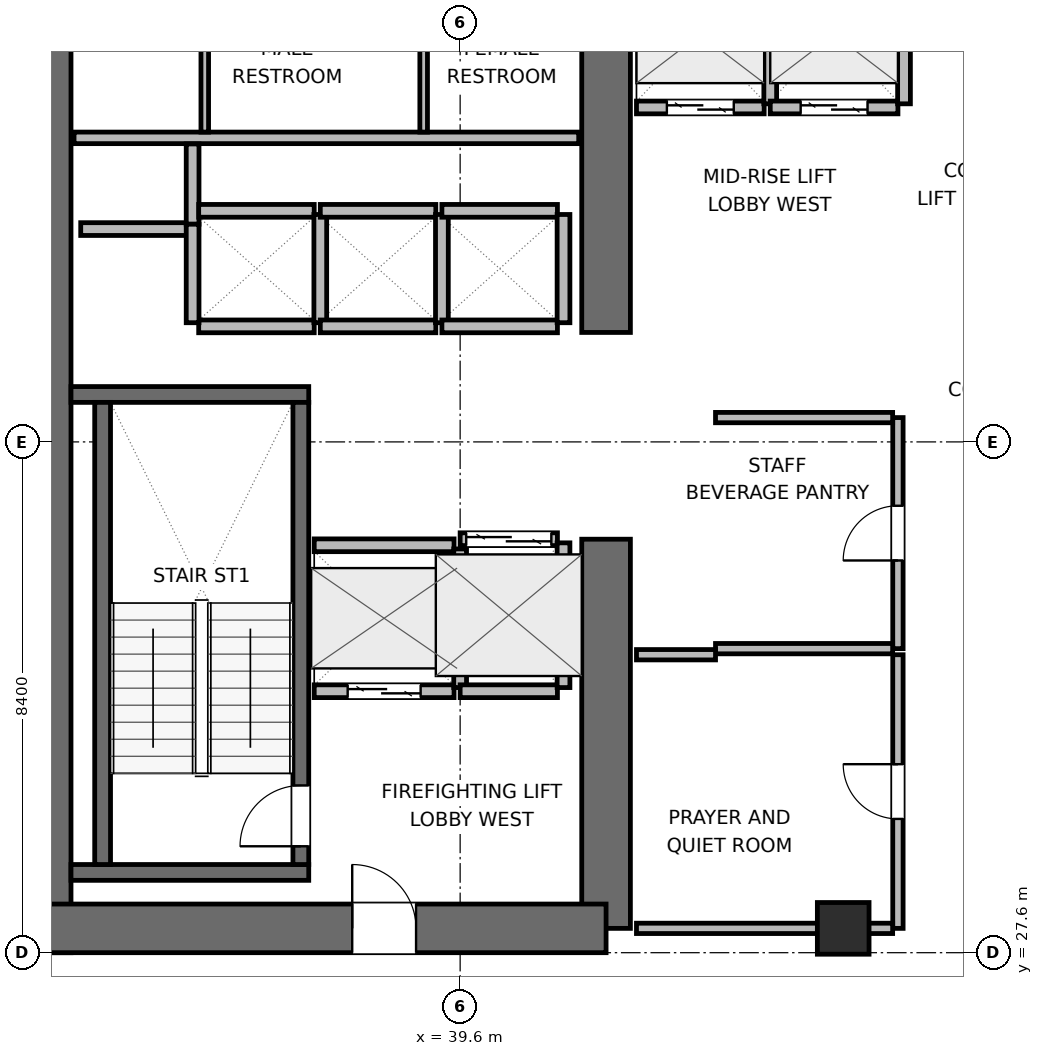
"""IFC4 building model, lengths in metres.
Left out: names, types, materials, properties, quantities, classifications, styles, units other than length and angle.
Written with IfcOpenShell. Run it as: python <this file> out.ifc"""

import sys

from ifc_helpers import new_model, si_unit, direction, frame, frame_2d, origin, origin_2d, place, context, subcontext, project, spatial, rectangle, extrude, element, fill, save


model = new_model("IFC4")
c1 = context("Model", 3, precision=1e-05, world=origin(), true_north=direction((0.0, 1.0)))
c2 = subcontext(c1, "Body", "Model", "MODEL_VIEW")
j1 = project(units=[si_unit("LENGTHUNIT", "METRE"), si_unit("PLANEANGLEUNIT", "RADIAN")], contexts=[c1])
p1 = place(None, origin())
s1 = spatial("IfcSite", under=j1, at=p1, CompositionType="ELEMENT")
p2 = place(p1, origin())
s2 = spatial("IfcBuilding", under=s1, at=p2, CompositionType="ELEMENT")
p3 = place(p2, frame((0.0, 0.0, 154.5)))
s3 = spatial("IfcBuildingStorey", under=s2, at=p3, CompositionType="ELEMENT", Elevation=154.5)
p4 = place(p3, frame((32.8, 27.6, 0.0), z_axis=(0.0, 0.0, 1.0), x_axis=(0.0, 1.0, 0.0)))
e1 = element("IfcWall", 1, at=p4, inside=s3, PredefinedType="SHEAR", context=c2, shape_type="SweptSolid", body=[
    extrude(rectangle(XDim=16.8, YDim=0.8, at=frame_2d((8.4, 0.0))), origin(), (0.0, 0.0, 1.0), 3.9),
])
p5 = place(p3, frame((42.0, 28.0, 0.0), z_axis=(0.0, 0.0, 1.0), x_axis=(0.0, 1.0, 0.0)))
e2 = element("IfcWall", 2, at=p5, inside=s3, PredefinedType="SHEAR", context=c2, shape_type="SweptSolid", body=[
    extrude(rectangle(XDim=6.4, YDim=0.8, at=frame_2d((3.2, 0.0))), origin(), (0.0, 0.0, 1.0), 3.9),
])
p6 = place(p3, frame((42.0, 37.8, 0.0), z_axis=(0.0, 0.0, 1.0), x_axis=(0.0, 1.0, 0.0)))
e3 = element("IfcWall", 3, at=p6, inside=s3, PredefinedType="SHEAR", context=c2, shape_type="SweptSolid", body=[
    extrude(rectangle(XDim=6.2, YDim=0.8, at=frame_2d((3.1, 0.0))), origin(), (0.0, 0.0, 1.0), 3.9),
])
p7 = place(p3, frame((32.8, 28.0, 0.0), z_axis=(0.0, 0.0, 1.0), x_axis=(1.0, 0.0, 0.0)))
e4 = element("IfcWall", 4, at=p7, inside=s3, PredefinedType="SHEAR", context=c2, shape_type="SweptSolid", body=[
    extrude(rectangle(XDim=9.2, YDim=0.8, at=frame_2d((4.6, 0.0))), origin(), (0.0, 0.0, 1.0), 3.9),
])
p8 = place(p7, frame((5.025, 0.0, 0.0)))
e5 = element("IfcOpeningElement", 5, at=p8, cuts=e4, PredefinedType="OPENING", context=c2, shape_type="SweptSolid", body=[
    extrude(rectangle(XDim=1.05, YDim=2.04, at=frame_2d((0.525, 1.02))), frame((0.0, 0.41, 0.0), z_axis=(0.0, -1.0, 0.0), x_axis=(1.0, 0.0, 0.0)), (0.0, 0.0, 1.0), 0.82),
])
for number, where, z_axis, x_axis in (
    (6, (33.2, 28.92, 0.0), (0.0, 0.0, 1.0), (1.0, 0.0, 0.0)),
    (7, (33.2, 36.78, 0.0), (0.0, 0.0, 1.0), (1.0, 0.0, 0.0)),
):
    element("IfcWall", number, at=place(p3, frame(where, z_axis=z_axis, x_axis=x_axis)), inside=s3, PredefinedType="SHEAR", context=c2, shape_type="SweptSolid", body=[
        extrude(rectangle(XDim=3.91, YDim=0.26, at=frame_2d((1.955, 0.0))), origin(), (0.0, 0.0, 1.0), 3.9),
    ])
p9 = place(p3, frame((33.72, 29.05, 0.0), z_axis=(0.0, 0.0, 1.0), x_axis=(0.0, 1.0, 0.0)))
e8 = element("IfcWall", 8, at=p9, inside=s3, PredefinedType="SHEAR", context=c2, shape_type="SweptSolid", body=[
    extrude(rectangle(XDim=7.6, YDim=0.26, at=frame_2d((3.8, 0.0))), origin(), (0.0, 0.0, 1.0), 3.9),
])
p10 = place(p3, frame((36.98, 29.05, 0.0), z_axis=(0.0, 0.0, 1.0), x_axis=(0.0, 1.0, 0.0)))
e9 = element("IfcWall", 9, at=p10, inside=s3, PredefinedType="SHEAR", context=c2, shape_type="SweptSolid", body=[
    extrude(rectangle(XDim=7.6, YDim=0.26, at=frame_2d((3.8, 0.0))), origin(), (0.0, 0.0, 1.0), 3.9),
])
p11 = place(p10, frame((0.3, 0.0, 0.0)))
e10 = element("IfcOpeningElement", 10, at=p11, cuts=e9, PredefinedType="OPENING", context=c2, shape_type="SweptSolid", body=[
    extrude(rectangle(XDim=1.0, YDim=2.04, at=frame_2d((0.5, 1.02))), frame((0.0, 0.14, 0.0), z_axis=(0.0, -1.0, 0.0), x_axis=(1.0, 0.0, 0.0)), (0.0, 0.0, 1.0), 0.28),
])
p12 = place(p3, frame((45.9, 28.0, 0.0), z_axis=(0.0, 0.0, 1.0), x_axis=(1.0, 0.0, 0.0)))
e11 = element("IfcColumn", 11, at=p12, inside=s3, PredefinedType="COLUMN", context=c2, shape_type="SweptSolid", body=[
    extrude(rectangle(XDim=0.85, YDim=0.85, at=origin_2d()), origin(), (0.0, 0.0, 1.0), 3.9),
])
p13 = place(p3, frame((33.25, 41.0, 0.0), z_axis=(0.0, 0.0, 1.0), x_axis=(1.0, 0.0, 0.0)))
e12 = element("IfcWall", 12, at=p13, inside=s3, PredefinedType="PLUMBINGWALL", context=c2, shape_type="SweptSolid", body=[
    extrude(rectangle(XDim=8.3, YDim=0.19, at=frame_2d((4.15, 0.0))), origin(), (0.0, 0.0, 1.0), 3.68),
])
for number, where, z_axis, x_axis in (
    (13, (35.4, 41.095, 0.0), (0.0, 0.0, 1.0), (0.0, 1.0, 0.0)),
    (14, (39.0, 41.095, 0.0), (0.0, 0.0, 1.0), (0.0, 1.0, 0.0)),
):
    element("IfcWall", number, at=place(p3, frame(where, z_axis=z_axis, x_axis=x_axis)), inside=s3, PredefinedType="PARTITIONING", context=c2, shape_type="SweptSolid", body=[
        extrude(rectangle(XDim=2.455, YDim=0.125, at=frame_2d((1.228, 0.0))), origin(), (0.0, 0.0, 1.0), 3.68),
    ])
p14 = place(p3, frame((33.36, 39.5, 0.0), z_axis=(0.0, 0.0, 1.0), x_axis=(1.0, 0.0, 0.0)))
e15 = element("IfcWall", 15, at=p14, inside=s3, PredefinedType="PARTITIONING", context=c2, shape_type="SweptSolid", body=[
    extrude(rectangle(XDim=1.86, YDim=0.21, at=frame_2d((0.93, 0.0))), origin(), (0.0, 0.0, 1.0), 3.68),
])
p15 = place(p3, frame((35.2, 39.58, 0.0), z_axis=(0.0, 0.0, 1.0), x_axis=(0.0, 1.0, 0.0)))
e16 = element("IfcWall", 16, at=p15, inside=s3, PredefinedType="PARTITIONING", context=c2, shape_type="SweptSolid", body=[
    extrude(rectangle(XDim=1.32, YDim=0.21, at=frame_2d((0.66, 0.0))), origin(), (0.0, 0.0, 1.0), 3.68),
])
p16 = place(p3, frame((37.2, 31.9, 0.0), z_axis=(0.0, 0.0, 1.0), x_axis=(1.0, 0.0, 0.0)))
e17 = element("IfcWall", 17, at=p16, inside=s3, PredefinedType="PARTITIONING", context=c2, shape_type="SweptSolid", body=[
    extrude(rectangle(XDim=2.3, YDim=0.21, at=frame_2d((1.15, 0.0))), origin(), (0.0, 0.0, 1.0), 3.68),
])
p17 = place(p16, frame((0.55, 0.0, 0.0)))
e18 = element("IfcOpeningElement", 18, at=p17, cuts=e17, PredefinedType="OPENING", context=c2, shape_type="SweptSolid", body=[
    extrude(rectangle(XDim=1.2, YDim=2.04, at=frame_2d((0.6, 1.02))), frame((0.0, 0.115, 0.0), z_axis=(0.0, -1.0, 0.0), x_axis=(1.0, 0.0, 0.0)), (0.0, 0.0, 1.0), 0.23),
])
p18 = place(p3, frame((37.2, 34.3, 0.0), z_axis=(0.0, 0.0, 1.0), x_axis=(1.0, 0.0, 0.0)))
e19 = element("IfcWall", 19, at=p18, inside=s3, PredefinedType="PARTITIONING", context=c2, shape_type="SweptSolid", body=[
    extrude(rectangle(XDim=2.3, YDim=0.21, at=frame_2d((1.15, 0.0))), origin(), (0.0, 0.0, 1.0), 3.68),
])
p19 = place(p3, frame((39.6, 31.96, 0.0), z_axis=(0.0, 0.0, 1.0), x_axis=(0.0, 1.0, 0.0)))
e20 = element("IfcWall", 20, at=p19, inside=s3, PredefinedType="PARTITIONING", context=c2, shape_type="SweptSolid", body=[
    extrude(rectangle(XDim=2.28, YDim=0.21, at=frame_2d((1.14, 0.0))), origin(), (0.0, 0.0, 1.0), 3.68),
])
p20 = place(p3, frame((39.6, 34.4, 0.0), z_axis=(0.0, 0.0, 1.0), x_axis=(1.0, 0.0, 0.0)))
e21 = element("IfcWall", 21, at=p20, inside=s3, PredefinedType="PARTITIONING", context=c2, shape_type="SweptSolid", body=[
    extrude(rectangle(XDim=1.6, YDim=0.21, at=frame_2d((0.8, 0.0))), origin(), (0.0, 0.0, 1.0), 3.68),
])
p21 = place(p20, frame((0.1, 0.0, 0.0)))
e22 = element("IfcOpeningElement", 22, at=p21, cuts=e21, PredefinedType="OPENING", context=c2, shape_type="SweptSolid", body=[
    extrude(rectangle(XDim=1.4, YDim=2.06, at=frame_2d((0.7, 1.03))), frame((0.0, 0.115, 0.0), z_axis=(0.0, -1.0, 0.0), x_axis=(1.0, 0.0, 0.0)), (0.0, 0.0, 1.0), 0.23),
])
p22 = place(p3, frame((39.6, 31.9, 0.0), z_axis=(0.0, 0.0, 1.0), x_axis=(1.0, 0.0, 0.0)))
e23 = element("IfcWall", 23, at=p22, inside=s3, PredefinedType="PARTITIONING", context=c2, shape_type="SweptSolid", body=[
    extrude(rectangle(XDim=1.6, YDim=0.21, at=frame_2d((0.8, 0.0))), origin(), (0.0, 0.0, 1.0), 3.68),
])
p23 = place(p3, frame((41.3, 31.96, 0.0), z_axis=(0.0, 0.0, 1.0), x_axis=(0.0, 1.0, 0.0)))
e24 = element("IfcWall", 24, at=p23, inside=s3, PredefinedType="PARTITIONING", context=c2, shape_type="SweptSolid", body=[
    extrude(rectangle(XDim=2.38, YDim=0.21, at=frame_2d((1.19, 0.0))), origin(), (0.0, 0.0, 1.0), 3.68),
])
p24 = place(p3, frame((42.5, 41.5, 0.0), z_axis=(0.0, 0.0, 1.0), x_axis=(1.0, 0.0, 0.0)))
e25 = element("IfcWall", 25, at=p24, inside=s3, PredefinedType="PARTITIONING", context=c2, shape_type="SweptSolid", body=[
    extrude(rectangle(XDim=2.1, YDim=0.21, at=frame_2d((1.05, 0.0))), origin(), (0.0, 0.0, 1.0), 3.68),
])
p25 = place(p24, frame((0.5, 0.0, 0.0)))
e26 = element("IfcOpeningElement", 26, at=p25, cuts=e25, PredefinedType="OPENING", context=c2, shape_type="SweptSolid", body=[
    extrude(rectangle(XDim=1.1, YDim=2.04, at=frame_2d((0.55, 1.02))), frame((0.0, 0.115, 0.0), z_axis=(0.0, -1.0, 0.0), x_axis=(1.0, 0.0, 0.0)), (0.0, 0.0, 1.0), 0.23),
])
p26 = place(p3, frame((44.7, 41.56, 0.0), z_axis=(0.0, 0.0, 1.0), x_axis=(0.0, 1.0, 0.0)))
e27 = element("IfcWall", 27, at=p26, inside=s3, PredefinedType="PARTITIONING", context=c2, shape_type="SweptSolid", body=[
    extrude(rectangle(XDim=2.28, YDim=0.21, at=frame_2d((1.14, 0.0))), origin(), (0.0, 0.0, 1.0), 3.68),
])
p27 = place(p3, frame((44.7, 41.5, 0.0), z_axis=(0.0, 0.0, 1.0), x_axis=(1.0, 0.0, 0.0)))
e28 = element("IfcWall", 28, at=p27, inside=s3, PredefinedType="PARTITIONING", context=c2, shape_type="SweptSolid", body=[
    extrude(rectangle(XDim=2.1, YDim=0.21, at=frame_2d((1.05, 0.0))), origin(), (0.0, 0.0, 1.0), 3.68),
])
p28 = place(p27, frame((0.5, 0.0, 0.0)))
e29 = element("IfcOpeningElement", 29, at=p28, cuts=e28, PredefinedType="OPENING", context=c2, shape_type="SweptSolid", body=[
    extrude(rectangle(XDim=1.1, YDim=2.04, at=frame_2d((0.55, 1.02))), frame((0.0, 0.115, 0.0), z_axis=(0.0, -1.0, 0.0), x_axis=(1.0, 0.0, 0.0)), (0.0, 0.0, 1.0), 0.23),
])
p29 = place(p3, frame((46.9, 41.56, 0.0), z_axis=(0.0, 0.0, 1.0), x_axis=(0.0, 1.0, 0.0)))
e30 = element("IfcWall", 30, at=p29, inside=s3, PredefinedType="PARTITIONING", context=c2, shape_type="SweptSolid", body=[
    extrude(rectangle(XDim=2.28, YDim=0.21, at=frame_2d((1.14, 0.0))), origin(), (0.0, 0.0, 1.0), 3.68),
])
for number, where, z_axis, x_axis in (
    (31, (35.3, 37.9, 0.0), (0.0, 0.0, 1.0), (1.0, 0.0, 0.0)),
    (32, (35.3, 39.8, 0.0), (0.0, 0.0, 1.0), (1.0, 0.0, 0.0)),
):
    element("IfcWall", number, at=place(p3, frame(where, z_axis=z_axis, x_axis=x_axis)), inside=s3, PredefinedType="PARTITIONING", context=c2, shape_type="SweptSolid", body=[
        extrude(rectangle(XDim=1.9, YDim=0.21, at=frame_2d((0.95, 0.0))), origin(), (0.0, 0.0, 1.0), 3.68),
    ])
p30 = place(p3, frame((35.2, 37.96, 0.0), z_axis=(0.0, 0.0, 1.0), x_axis=(0.0, 1.0, 0.0)))
e33 = element("IfcWall", 33, at=p30, inside=s3, PredefinedType="PARTITIONING", context=c2, shape_type="SweptSolid", body=[
    extrude(rectangle(XDim=1.62, YDim=0.21, at=frame_2d((0.81, 0.0))), origin(), (0.0, 0.0, 1.0), 3.68),
])
p31 = place(p3, frame((37.3, 37.96, 0.0), z_axis=(0.0, 0.0, 1.0), x_axis=(0.0, 1.0, 0.0)))
e34 = element("IfcWall", 34, at=p31, inside=s3, PredefinedType="PARTITIONING", context=c2, shape_type="SweptSolid", body=[
    extrude(rectangle(XDim=1.78, YDim=0.21, at=frame_2d((0.89, 0.0))), origin(), (0.0, 0.0, 1.0), 3.68),
])
for number, where, z_axis, x_axis in (
    (35, (37.3, 37.9, 0.0), (0.0, 0.0, 1.0), (1.0, 0.0, 0.0)),
    (36, (37.3, 39.8, 0.0), (0.0, 0.0, 1.0), (1.0, 0.0, 0.0)),
):
    element("IfcWall", number, at=place(p3, frame(where, z_axis=z_axis, x_axis=x_axis)), inside=s3, PredefinedType="PARTITIONING", context=c2, shape_type="SweptSolid", body=[
        extrude(rectangle(XDim=1.9, YDim=0.21, at=frame_2d((0.95, 0.0))), origin(), (0.0, 0.0, 1.0), 3.68),
    ])
p32 = place(p3, frame((39.3, 37.96, 0.0), z_axis=(0.0, 0.0, 1.0), x_axis=(0.0, 1.0, 0.0)))
e37 = element("IfcWall", 37, at=p32, inside=s3, PredefinedType="PARTITIONING", context=c2, shape_type="SweptSolid", body=[
    extrude(rectangle(XDim=1.78, YDim=0.21, at=frame_2d((0.89, 0.0))), origin(), (0.0, 0.0, 1.0), 3.68),
])
for number, where, z_axis, x_axis in (
    (38, (39.3, 37.9, 0.0), (0.0, 0.0, 1.0), (1.0, 0.0, 0.0)),
    (39, (39.3, 39.8, 0.0), (0.0, 0.0, 1.0), (1.0, 0.0, 0.0)),
):
    element("IfcWall", number, at=place(p3, frame(where, z_axis=z_axis, x_axis=x_axis)), inside=s3, PredefinedType="PARTITIONING", context=c2, shape_type="SweptSolid", body=[
        extrude(rectangle(XDim=1.9, YDim=0.21, at=frame_2d((0.95, 0.0))), origin(), (0.0, 0.0, 1.0), 3.68),
    ])
p33 = place(p3, frame((41.3, 37.96, 0.0), z_axis=(0.0, 0.0, 1.0), x_axis=(0.0, 1.0, 0.0)))
e40 = element("IfcWall", 40, at=p33, inside=s3, PredefinedType="PARTITIONING", context=c2, shape_type="SweptSolid", body=[
    extrude(rectangle(XDim=1.78, YDim=0.21, at=frame_2d((0.89, 0.0))), origin(), (0.0, 0.0, 1.0), 3.68),
])
p34 = place(p3, frame((46.8, 32.6, 0.0), z_axis=(0.0, 0.0, 1.0), x_axis=(0.0, 1.0, 0.0)))
e41 = element("IfcWall", 41, at=p34, inside=s3, PredefinedType="PARTITIONING", context=c2, shape_type="SweptSolid", body=[
    extrude(rectangle(XDim=3.8, YDim=0.17, at=frame_2d((1.9, 0.0))), origin(), (0.0, 0.0, 1.0), 3.68),
])
p35 = place(p34, frame((1.45, 0.0, 0.0)))
e42 = element("IfcOpeningElement", 42, at=p35, cuts=e41, PredefinedType="OPENING", context=c2, shape_type="SweptSolid", body=[
    extrude(rectangle(XDim=0.9, YDim=2.02, at=frame_2d((0.45, 1.01))), frame((0.0, 0.095, 0.0), z_axis=(0.0, -1.0, 0.0), x_axis=(1.0, 0.0, 0.0)), (0.0, 0.0, 1.0), 0.19),
])
for number, where, z_axis, x_axis in (
    (43, (43.8, 32.6, 0.0), (0.0, 0.0, 1.0), (1.0, 0.0, 0.0)),
    (44, (43.8, 36.4, 0.0), (0.0, 0.0, 1.0), (1.0, 0.0, 0.0)),
):
    element("IfcWall", number, at=place(p3, frame(where, z_axis=z_axis, x_axis=x_axis)), inside=s3, PredefinedType="PARTITIONING", context=c2, shape_type="SweptSolid", body=[
        extrude(rectangle(XDim=2.913, YDim=0.17, at=frame_2d((1.457, 0.0))), origin(), (0.0, 0.0, 1.0), 3.68),
    ])
p36 = place(p3, frame((46.8, 28.0, 0.0), z_axis=(0.0, 0.0, 1.0), x_axis=(0.0, 1.0, 0.0)))
e45 = element("IfcWall", 45, at=p36, inside=s3, PredefinedType="PARTITIONING", context=c2, shape_type="SweptSolid", body=[
    extrude(rectangle(XDim=4.5, YDim=0.17, at=frame_2d((2.25, 0.0))), origin(), (0.0, 0.0, 1.0), 3.68),
])
p37 = place(p36, frame((1.8, 0.0, 0.0)))
e46 = element("IfcOpeningElement", 46, at=p37, cuts=e45, PredefinedType="OPENING", context=c2, shape_type="SweptSolid", body=[
    extrude(rectangle(XDim=0.9, YDim=2.02, at=frame_2d((0.45, 1.01))), frame((0.0, 0.095, 0.0), z_axis=(0.0, -1.0, 0.0), x_axis=(1.0, 0.0, 0.0)), (0.0, 0.0, 1.0), 0.19),
])
p38 = place(p3, frame((42.5, 28.0, 0.0), z_axis=(0.0, 0.0, 1.0), x_axis=(1.0, 0.0, 0.0)))
e47 = element("IfcWall", 47, at=p38, inside=s3, PredefinedType="PARTITIONING", context=c2, shape_type="SweptSolid", body=[
    extrude(rectangle(XDim=4.213, YDim=0.17, at=frame_2d((2.106, 0.0))), origin(), (0.0, 0.0, 1.0), 2.565),
])
p39 = place(p3, frame((42.5, 32.5, 0.0), z_axis=(0.0, 0.0, 1.0), x_axis=(1.0, 0.0, 0.0)))
e48 = element("IfcWall", 48, at=p39, inside=s3, PredefinedType="PARTITIONING", context=c2, shape_type="SweptSolid", body=[
    extrude(rectangle(XDim=1.3, YDim=0.17, at=frame_2d((0.65, 0.0))), origin(), (0.0, 0.0, 1.0), 3.68),
])
p40 = place(p11, origin())
e49 = element("IfcDoor", 49, at=p40, inside=s3, OperationType="SINGLE_SWING_LEFT", PredefinedType="DOOR", context=c2, shape_type="SweptSolid", body=[
    extrude(rectangle(XDim=1.0, YDim=2.04, at=frame_2d((0.5, 1.02))), frame((0.0, 0.025, 0.0), z_axis=(0.0, -1.0, 0.0), x_axis=(1.0, 0.0, 0.0)), (0.0, 0.0, 1.0), 0.05),
])
fill(e10, e49)
p41 = place(p17, origin())
e50 = element("IfcDoor", 50, at=p41, inside=s3, OperationType="DOUBLE_DOOR_SLIDING", PredefinedType="DOOR", context=c2, shape_type="SweptSolid", body=[
    extrude(rectangle(XDim=1.2, YDim=2.04, at=frame_2d((0.6, 1.02))), frame((0.0, 0.025, 0.0), z_axis=(0.0, -1.0, 0.0), x_axis=(1.0, 0.0, 0.0)), (0.0, 0.0, 1.0), 0.05),
])
fill(e18, e50)
p42 = place(p21, origin())
e51 = element("IfcDoor", 51, at=p42, inside=s3, OperationType="DOUBLE_DOOR_SLIDING", PredefinedType="DOOR", context=c2, shape_type="SweptSolid", body=[
    extrude(rectangle(XDim=1.4, YDim=2.06, at=frame_2d((0.7, 1.03))), frame((0.0, 0.025, 0.0), z_axis=(0.0, -1.0, 0.0), x_axis=(1.0, 0.0, 0.0)), (0.0, 0.0, 1.0), 0.05),
])
fill(e22, e51)
p43 = place(p25, origin())
e52 = element("IfcDoor", 52, at=p43, inside=s3, OperationType="DOUBLE_DOOR_SLIDING", PredefinedType="DOOR", context=c2, shape_type="SweptSolid", body=[
    extrude(rectangle(XDim=1.1, YDim=2.04, at=frame_2d((0.55, 1.02))), frame((0.0, 0.025, 0.0), z_axis=(0.0, -1.0, 0.0), x_axis=(1.0, 0.0, 0.0)), (0.0, 0.0, 1.0), 0.05),
])
fill(e26, e52)
p44 = place(p28, origin())
e53 = element("IfcDoor", 53, at=p44, inside=s3, OperationType="DOUBLE_DOOR_SLIDING", PredefinedType="DOOR", context=c2, shape_type="SweptSolid", body=[
    extrude(rectangle(XDim=1.1, YDim=2.04, at=frame_2d((0.55, 1.02))), frame((0.0, 0.025, 0.0), z_axis=(0.0, -1.0, 0.0), x_axis=(1.0, 0.0, 0.0)), (0.0, 0.0, 1.0), 0.05),
])
fill(e29, e53)
p45 = place(p8, origin())
e54 = element("IfcDoor", 54, at=p45, inside=s3, OperationType="SINGLE_SWING_LEFT", PredefinedType="DOOR", context=c2, shape_type="SweptSolid", body=[
    extrude(rectangle(XDim=1.05, YDim=2.04, at=frame_2d((0.525, 1.02))), frame((0.0, 0.025, 0.0), z_axis=(0.0, -1.0, 0.0), x_axis=(1.0, 0.0, 0.0)), (0.0, 0.0, 1.0), 0.05),
])
fill(e5, e54)
p46 = place(p35, origin())
e55 = element("IfcDoor", 55, at=p46, inside=s3, OperationType="SINGLE_SWING_LEFT", PredefinedType="DOOR", context=c2, shape_type="SweptSolid", body=[
    extrude(rectangle(XDim=0.9, YDim=2.02, at=frame_2d((0.45, 1.01))), frame((0.0, 0.025, 0.0), z_axis=(0.0, -1.0, 0.0), x_axis=(1.0, 0.0, 0.0)), (0.0, 0.0, 1.0), 0.05),
])
fill(e42, e55)
p47 = place(p37, origin())
e56 = element("IfcDoor", 56, at=p47, inside=s3, OperationType="SINGLE_SWING_RIGHT", PredefinedType="DOOR", context=c2, shape_type="SweptSolid", body=[
    extrude(rectangle(XDim=0.9, YDim=2.02, at=frame_2d((0.45, 1.01))), frame((0.0, 0.025, 0.0), z_axis=(0.0, -1.0, 0.0), x_axis=(1.0, 0.0, 0.0)), (0.0, 0.0, 1.0), 0.05),
])
fill(e46, e56)
save(model, sys.argv[1])
